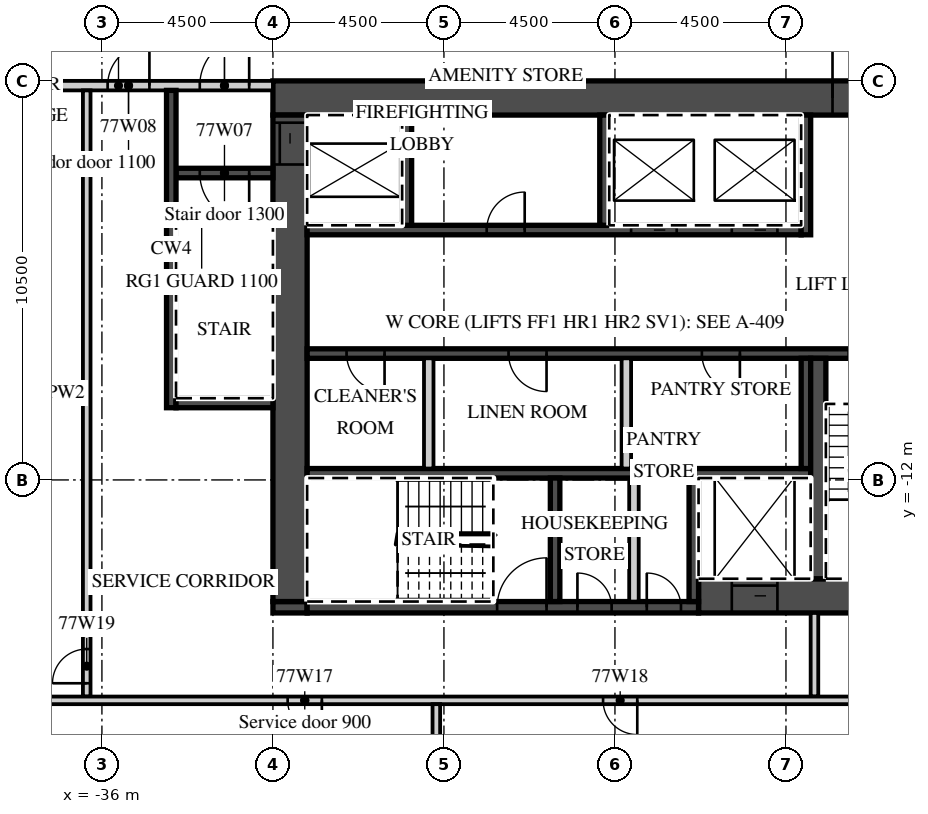
"""IFC4 building model, lengths in metres.
Left out: names, types, materials, properties, quantities, classifications, styles, units other than length and angle.
Written with IfcOpenShell. Run it as: python <this file> out.ifc"""

import sys

from ifc_helpers import new_model, si_unit, direction, frame, frame_2d, origin, place, context, subcontext, project, spatial, rectangle, extrude, element, fill, save


model = new_model("IFC4")
c1 = context("Model", 3, precision=1e-05, world=origin(), true_north=direction((0.0, 1.0)))
c2 = subcontext(c1, "Body", "Model", "MODEL_VIEW")
j1 = project(units=[si_unit("LENGTHUNIT", "METRE"), si_unit("PLANEANGLEUNIT", "RADIAN")], contexts=[c1])
p1 = place(None, origin())
s1 = spatial("IfcSite", under=j1, at=p1, CompositionType="ELEMENT")
p2 = place(p1, origin())
s2 = spatial("IfcBuilding", under=s1, at=p2, CompositionType="ELEMENT")
p3 = place(p2, frame((0.0, 0.0, 304.8)))
s3 = spatial("IfcBuildingStorey", under=s2, at=p3, CompositionType="ELEMENT", Elevation=304.8)
p4 = place(p3, frame((-31.5, -1.95, 0.0), z_axis=(0.0, 0.0, 1.0), x_axis=(1.0, 0.0, 0.0)))
e1 = element("IfcWall", 1, at=p4, inside=s3, PredefinedType="SHEAR", context=c2, shape_type="SweptSolid", body=[
    extrude(rectangle(XDim=18.0, YDim=0.9, at=frame_2d((9.0, 0.0))), origin(), (0.0, 0.0, 1.0), 2.9),
])
p5 = place(p4, frame((14.725, 0.0, 0.0)))
e2 = element("IfcOpeningElement", 2, at=p5, cuts=e1, PredefinedType="OPENING", context=c2, shape_type="SweptSolid", body=[
    extrude(rectangle(XDim=1.8, YDim=2.1, at=frame_2d((0.9, 1.05))), frame((0.0, 0.46, 0.0), z_axis=(0.0, -1.0, 0.0), x_axis=(1.0, 0.0, 0.0)), (0.0, 0.0, 1.0), 0.92),
])
p6 = place(p3, frame((-20.3, -15.05, 0.0), z_axis=(0.0, 0.0, 1.0), x_axis=(1.0, 0.0, 0.0)))
e3 = element("IfcWall", 3, at=p6, inside=s3, PredefinedType="SHEAR", context=c2, shape_type="SweptSolid", body=[
    extrude(rectangle(XDim=6.8, YDim=0.9, at=frame_2d((3.4, 0.0))), origin(), (0.0, 0.0, 1.0), 2.9),
])
p7 = place(p6, frame((0.875, 0.0, 0.0)))
e4 = element("IfcOpeningElement", 4, at=p7, cuts=e3, PredefinedType="OPENING", context=c2, shape_type="SweptSolid", body=[
    extrude(rectangle(XDim=1.2, YDim=2.1, at=frame_2d((0.6, 1.05))), frame((0.0, 0.46, 0.0), z_axis=(0.0, -1.0, 0.0), x_axis=(1.0, 0.0, 0.0)), (0.0, 0.0, 1.0), 0.92),
])
p8 = place(p3, frame((-31.5, -15.35, 0.0), z_axis=(0.0, 0.0, 1.0), x_axis=(1.0, 0.0, 0.0)))
e5 = element("IfcWall", 5, at=p8, inside=s3, PredefinedType="SHEAR", context=c2, shape_type="SweptSolid", body=[
    extrude(rectangle(XDim=0.9, YDim=0.3, at=frame_2d((0.45, 0.0))), origin(), (0.0, 0.0, 1.0), 2.9),
])
p9 = place(p3, frame((-30.6, -15.35, 0.0), z_axis=(0.0, 0.0, 1.0), x_axis=(1.0, 0.0, 0.0)))
e6 = element("IfcWall", 6, at=p9, inside=s3, PredefinedType="SHEAR", context=c2, shape_type="SweptSolid", body=[
    extrude(rectangle(XDim=10.3, YDim=0.3, at=frame_2d((5.15, 0.0))), origin(), (0.0, 0.0, 1.0), 2.9),
])
p10 = place(p9, frame((5.0, 0.0, 0.0)))
e7 = element("IfcOpeningElement", 7, at=p10, cuts=e6, PredefinedType="OPENING", context=c2, shape_type="SweptSolid", body=[
    extrude(rectangle(XDim=1.3, YDim=2.1, at=frame_2d((0.65, 1.05))), frame((0.0, 0.16, 0.0), z_axis=(0.0, -1.0, 0.0), x_axis=(1.0, 0.0, 0.0)), (0.0, 0.0, 1.0), 0.32),
])
p11 = place(p9, frame((7.113, 0.0, 0.0)))
e8 = element("IfcOpeningElement", 8, at=p11, cuts=e6, PredefinedType="OPENING", context=c2, shape_type="SweptSolid", body=[
    extrude(rectangle(XDim=0.9, YDim=2.1, at=frame_2d((0.45, 1.05))), frame((0.0, 0.16, 0.0), z_axis=(0.0, -1.0, 0.0), x_axis=(1.0, 0.0, 0.0)), (0.0, 0.0, 1.0), 0.32),
])
p12 = place(p9, frame((8.938, 0.0, 0.0)))
e9 = element("IfcOpeningElement", 9, at=p12, cuts=e6, PredefinedType="OPENING", context=c2, shape_type="SweptSolid", body=[
    extrude(rectangle(XDim=0.9, YDim=2.1, at=frame_2d((0.45, 1.05))), frame((0.0, 0.16, 0.0), z_axis=(0.0, -1.0, 0.0), x_axis=(1.0, 0.0, 0.0)), (0.0, 0.0, 1.0), 0.32),
])
p13 = place(p3, frame((-31.05, -15.2, 0.0), z_axis=(0.0, 0.0, 1.0), x_axis=(0.0, 1.0, 0.0)))
e10 = element("IfcWall", 10, at=p13, inside=s3, PredefinedType="SHEAR", context=c2, shape_type="SweptSolid", body=[
    extrude(rectangle(XDim=12.8, YDim=0.9, at=frame_2d((6.4, 0.0))), origin(), (0.0, 0.0, 1.0), 2.9),
])
p14 = place(p13, frame((11.5, 0.0, 0.0)))
e11 = element("IfcOpeningElement", 11, at=p14, cuts=e10, PredefinedType="OPENING", context=c2, shape_type="SweptSolid", body=[
    extrude(rectangle(XDim=1.1, YDim=2.1, at=frame_2d((0.55, 1.05))), frame((0.0, 0.46, 0.0), z_axis=(0.0, -1.0, 0.0), x_axis=(1.0, 0.0, 0.0)), (0.0, 0.0, 1.0), 0.92),
])
p15 = place(p3, frame((-30.6, -5.425, 0.0), z_axis=(0.0, 0.0, 1.0), x_axis=(1.0, 0.0, 0.0)))
e12 = element("IfcWall", 12, at=p15, inside=s3, PredefinedType="SHEAR", context=c2, shape_type="SweptSolid", body=[
    extrude(rectangle(XDim=13.0, YDim=0.25, at=frame_2d((6.5, 0.0))), origin(), (0.0, 0.0, 1.0), 2.9),
])
p16 = place(p15, frame((8.525, 0.0, 0.0)))
e13 = element("IfcOpeningElement", 13, at=p16, cuts=e12, PredefinedType="OPENING", context=c2, shape_type="SweptSolid", body=[
    extrude(rectangle(XDim=1.2, YDim=2.1, at=frame_2d((0.6, 1.05))), frame((0.0, 0.135, 0.0), z_axis=(0.0, -1.0, 0.0), x_axis=(1.0, 0.0, 0.0)), (0.0, 0.0, 1.0), 0.27),
])
p17 = place(p15, frame((11.175, 0.0, 0.0)))
e14 = element("IfcOpeningElement", 14, at=p17, cuts=e12, PredefinedType="OPENING", context=c2, shape_type="SweptSolid", body=[
    extrude(rectangle(XDim=1.2, YDim=2.1, at=frame_2d((0.6, 1.05))), frame((0.0, 0.135, 0.0), z_axis=(0.0, -1.0, 0.0), x_axis=(1.0, 0.0, 0.0)), (0.0, 0.0, 1.0), 0.27),
])
p18 = place(p15, frame((4.725, 0.0, 0.0)))
e15 = element("IfcOpeningElement", 15, at=p18, cuts=e12, PredefinedType="OPENING", context=c2, shape_type="SweptSolid", body=[
    extrude(rectangle(XDim=1.0, YDim=2.1, at=frame_2d((0.5, 1.05))), frame((0.0, 0.135, 0.0), z_axis=(0.0, -1.0, 0.0), x_axis=(1.0, 0.0, 0.0)), (0.0, 0.0, 1.0), 0.27),
])
p19 = place(p3, frame((-17.475, -5.55, 0.0), z_axis=(0.0, 0.0, 1.0), x_axis=(0.0, 1.0, 0.0)))
e16 = element("IfcWall", 16, at=p19, inside=s3, PredefinedType="SHEAR", context=c2, shape_type="SweptSolid", body=[
    extrude(rectangle(XDim=3.15, YDim=0.25, at=frame_2d((1.575, 0.0))), origin(), (0.0, 0.0, 1.0), 2.9),
])
for number, where, z_axis, x_axis in (
    (17, (-27.975, -5.3, 0.0), (0.0, 0.0, 1.0), (0.0, 1.0, 0.0)),
    (18, (-22.775, -5.3, 0.0), (0.0, 0.0, 1.0), (0.0, 1.0, 0.0)),
):
    element("IfcWall", number, at=place(p3, frame(where, z_axis=z_axis, x_axis=x_axis)), inside=s3, PredefinedType="SHEAR", context=c2, shape_type="SweptSolid", body=[
        extrude(rectangle(XDim=2.9, YDim=0.25, at=frame_2d((1.45, 0.0))), origin(), (0.0, 0.0, 1.0), 2.9),
    ])
p20 = place(p3, frame((-30.6, -8.675, 0.0), z_axis=(0.0, 0.0, 1.0), x_axis=(1.0, 0.0, 0.0)))
e19 = element("IfcWall", 19, at=p20, inside=s3, PredefinedType="SHEAR", context=c2, shape_type="SweptSolid", body=[
    extrude(rectangle(XDim=16.2, YDim=0.25, at=frame_2d((8.1, 0.0))), origin(), (0.0, 0.0, 1.0), 2.9),
])
p21 = place(p20, frame((14.25, 0.0, 0.0)))
e20 = element("IfcOpeningElement", 20, at=p21, cuts=e19, PredefinedType="OPENING", context=c2, shape_type="SweptSolid", body=[
    extrude(rectangle(XDim=1.3, YDim=2.1, at=frame_2d((0.65, 1.05))), frame((0.0, 0.135, 0.0), z_axis=(0.0, -1.0, 0.0), x_axis=(1.0, 0.0, 0.0)), (0.0, 0.0, 1.0), 0.27),
])
p22 = place(p20, frame((1.038, 0.0, 0.0)))
e21 = element("IfcOpeningElement", 21, at=p22, cuts=e19, PredefinedType="OPENING", context=c2, shape_type="SweptSolid", body=[
    extrude(rectangle(XDim=1.0, YDim=2.1, at=frame_2d((0.5, 1.05))), frame((0.0, 0.135, 0.0), z_axis=(0.0, -1.0, 0.0), x_axis=(1.0, 0.0, 0.0)), (0.0, 0.0, 1.0), 0.27),
])
p23 = place(p20, frame((5.3, 0.0, 0.0)))
e22 = element("IfcOpeningElement", 22, at=p23, cuts=e19, PredefinedType="OPENING", context=c2, shape_type="SweptSolid", body=[
    extrude(rectangle(XDim=1.0, YDim=2.1, at=frame_2d((0.5, 1.05))), frame((0.0, 0.135, 0.0), z_axis=(0.0, -1.0, 0.0), x_axis=(1.0, 0.0, 0.0)), (0.0, 0.0, 1.0), 0.27),
])
p24 = place(p20, frame((10.387, 0.0, 0.0)))
e23 = element("IfcOpeningElement", 23, at=p24, cuts=e19, PredefinedType="OPENING", context=c2, shape_type="SweptSolid", body=[
    extrude(rectangle(XDim=1.0, YDim=2.1, at=frame_2d((0.5, 1.05))), frame((0.0, 0.135, 0.0), z_axis=(0.0, -1.0, 0.0), x_axis=(1.0, 0.0, 0.0)), (0.0, 0.0, 1.0), 0.27),
])
p25 = place(p3, frame((-30.6, -11.825, 0.0), z_axis=(0.0, 0.0, 1.0), x_axis=(1.0, 0.0, 0.0)))
e24 = element("IfcWall", 24, at=p25, inside=s3, PredefinedType="SHEAR", context=c2, shape_type="SweptSolid", body=[
    extrude(rectangle(XDim=13.25, YDim=0.25, at=frame_2d((6.625, 0.0))), origin(), (0.0, 0.0, 1.0), 2.9),
])
p26 = place(p3, frame((-17.475, -11.7, 0.0), z_axis=(0.0, 0.0, 1.0), x_axis=(0.0, 1.0, 0.0)))
e25 = element("IfcWall", 25, at=p26, inside=s3, PredefinedType="SHEAR", context=c2, shape_type="SweptSolid", body=[
    extrude(rectangle(XDim=2.9, YDim=0.25, at=frame_2d((1.45, 0.0))), origin(), (0.0, 0.0, 1.0), 2.9),
])
for number, where, z_axis, x_axis in (
    (26, (-27.4, -11.7, 0.0), (0.0, 0.0, 1.0), (0.0, 1.0, 0.0)),
    (27, (-22.2, -11.7, 0.0), (0.0, 0.0, 1.0), (0.0, 1.0, 0.0)),
):
    element("IfcWall", number, at=place(p3, frame(where, z_axis=z_axis, x_axis=x_axis)), inside=s3, PredefinedType="PARTITIONING", context=c2, shape_type="SweptSolid", body=[
        extrude(rectangle(XDim=2.9, YDim=0.25, at=frame_2d((1.45, 0.0))), origin(), (0.0, 0.0, 1.0), 2.9),
    ])
p27 = place(p3, frame((-17.15, -14.6, 0.0), z_axis=(0.0, 0.0, 1.0), x_axis=(0.0, 1.0, 0.0)))
e28 = element("IfcWall", 28, at=p27, inside=s3, PredefinedType="SHEAR", context=c2, shape_type="SweptSolid", body=[
    extrude(rectangle(XDim=5.8, YDim=0.4, at=frame_2d((2.9, 0.0))), origin(), (0.0, 0.0, 1.0), 2.9),
])
for number, where, z_axis, x_axis in (
    (29, (-20.425, -15.2, 0.0), (0.0, 0.0, 1.0), (0.0, 1.0, 0.0)),
    (30, (-24.075, -15.2, 0.0), (0.0, 0.0, 1.0), (0.0, 1.0, 0.0)),
):
    element("IfcWall", number, at=place(p3, frame(where, z_axis=z_axis, x_axis=x_axis)), inside=s3, PredefinedType="SHEAR", context=c2, shape_type="SweptSolid", body=[
        extrude(rectangle(XDim=3.25, YDim=0.25, at=frame_2d((1.625, 0.0))), origin(), (0.0, 0.0, 1.0), 2.9),
    ])
p28 = place(p3, frame((-22.0, -15.2, 0.0), z_axis=(0.0, 0.0, 1.0), x_axis=(0.0, 1.0, 0.0)))
e31 = element("IfcWall", 31, at=p28, inside=s3, PredefinedType="PARTITIONING", context=c2, shape_type="SweptSolid", body=[
    extrude(rectangle(XDim=3.25, YDim=0.25, at=frame_2d((1.625, 0.0))), origin(), (0.0, 0.0, 1.0), 2.9),
])
p29 = place(p3, frame((-39.627, -1.625, 0.0), z_axis=(0.0, 0.0, 1.0), x_axis=(1.0, 0.0, 0.0)))
e32 = element("IfcWall", 32, at=p29, inside=s3, PredefinedType="PARTITIONING", context=c2, shape_type="SweptSolid", body=[
    extrude(rectangle(XDim=8.127, YDim=0.25, at=frame_2d((4.063, 0.0))), origin(), (0.0, 0.0, 1.0), 2.9),
])
p30 = place(p29, frame((6.202, 0.0, 0.0)))
e33 = element("IfcOpeningElement", 33, at=p30, cuts=e32, PredefinedType="OPENING", context=c2, shape_type="SweptSolid", body=[
    extrude(rectangle(XDim=1.3, YDim=2.1, at=frame_2d((0.65, 1.05))), frame((0.0, 0.135, 0.0), z_axis=(0.0, -1.0, 0.0), x_axis=(1.0, 0.0, 0.0)), (0.0, 0.0, 1.0), 0.27),
])
p31 = place(p29, frame((3.777, 0.0, 0.0)))
e34 = element("IfcOpeningElement", 34, at=p31, cuts=e32, PredefinedType="OPENING", context=c2, shape_type="SweptSolid", body=[
    extrude(rectangle(XDim=1.1, YDim=2.1, at=frame_2d((0.55, 1.05))), frame((0.0, 0.135, 0.0), z_axis=(0.0, -1.0, 0.0), x_axis=(1.0, 0.0, 0.0)), (0.0, 0.0, 1.0), 0.27),
])
p32 = place(p3, frame((-34.05, -3.925, 0.0), z_axis=(0.0, 0.0, 1.0), x_axis=(1.0, 0.0, 0.0)))
e35 = element("IfcWall", 35, at=p32, inside=s3, PredefinedType="SHEAR", context=c2, shape_type="SweptSolid", body=[
    extrude(rectangle(XDim=2.55, YDim=0.25, at=frame_2d((1.275, 0.0))), origin(), (0.0, 0.0, 1.0), 2.9),
])
p33 = place(p32, frame((0.625, 0.0, 0.0)))
e36 = element("IfcOpeningElement", 36, at=p33, cuts=e35, PredefinedType="OPENING", context=c2, shape_type="SweptSolid", body=[
    extrude(rectangle(XDim=1.3, YDim=2.1, at=frame_2d((0.65, 1.05))), frame((0.0, 0.135, 0.0), z_axis=(0.0, -1.0, 0.0), x_axis=(1.0, 0.0, 0.0)), (0.0, 0.0, 1.0), 0.27),
])
p34 = place(p3, frame((-34.175, -10.1, 0.0), z_axis=(0.0, 0.0, 1.0), x_axis=(0.0, 1.0, 0.0)))
e37 = element("IfcWall", 37, at=p34, inside=s3, PredefinedType="SHEAR", context=c2, shape_type="SweptSolid", body=[
    extrude(rectangle(XDim=8.35, YDim=0.25, at=frame_2d((4.175, 0.0))), origin(), (0.0, 0.0, 1.0), 2.9),
])
p35 = place(p3, frame((-34.05, -9.975, 0.0), z_axis=(0.0, 0.0, 1.0), x_axis=(1.0, 0.0, 0.0)))
e38 = element("IfcWall", 38, at=p35, inside=s3, PredefinedType="SHEAR", context=c2, shape_type="SweptSolid", body=[
    extrude(rectangle(XDim=2.55, YDim=0.25, at=frame_2d((1.275, 0.0))), origin(), (0.0, 0.0, 1.0), 2.9),
])
p36 = place(p3, frame((-17.25, -17.7, 0.0), z_axis=(0.0, 0.0, 1.0), x_axis=(0.0, 1.0, 0.0)))
e39 = element("IfcWall", 39, at=p36, inside=s3, PredefinedType="PARTITIONING", context=c2, shape_type="SweptSolid", body=[
    extrude(rectangle(XDim=2.2, YDim=0.2, at=frame_2d((1.1, 0.0))), origin(), (0.0, 0.0, 1.0), 2.9),
])
p37 = place(p3, frame((-36.4, -17.7, 0.0), z_axis=(0.0, 0.0, 1.0), x_axis=(0.0, 1.0, 0.0)))
e40 = element("IfcWall", 40, at=p37, inside=s3, PredefinedType="PARTITIONING", context=c2, shape_type="SweptSolid", body=[
    extrude(rectangle(XDim=15.95, YDim=0.2, at=frame_2d((7.975, 0.0))), origin(), (0.0, 0.0, 1.0), 2.9),
])
p38 = place(p37, frame((0.35, 0.0, 0.0)))
e41 = element("IfcOpeningElement", 41, at=p38, cuts=e40, PredefinedType="OPENING", context=c2, shape_type="SweptSolid", body=[
    extrude(rectangle(XDim=0.9, YDim=2.1, at=frame_2d((0.45, 1.05))), frame((0.0, 0.11, 0.0), z_axis=(0.0, -1.0, 0.0), x_axis=(1.0, 0.0, 0.0)), (0.0, 0.0, 1.0), 0.22),
])
p39 = place(p3, frame((-38.07, -17.8, 0.0), z_axis=(0.0, 0.0, 1.0), x_axis=(1.0, 0.0, 0.0)))
e42 = element("IfcWall", 42, at=p39, inside=s3, PredefinedType="PARTITIONING", context=c2, shape_type="SweptSolid", body=[
    extrude(rectangle(XDim=24.47, YDim=0.2, at=frame_2d((12.235, 0.0))), origin(), (0.0, 0.0, 1.0), 2.9),
])
p40 = place(p39, frame((6.957, 0.0, 0.0)))
e43 = element("IfcOpeningElement", 43, at=p40, cuts=e42, PredefinedType="OPENING", context=c2, shape_type="SweptSolid", body=[
    extrude(rectangle(XDim=0.9, YDim=2.1, at=frame_2d((0.45, 1.05))), frame((0.0, 0.11, 0.0), z_axis=(0.0, -1.0, 0.0), x_axis=(1.0, 0.0, 0.0)), (0.0, 0.0, 1.0), 0.22),
])
p41 = place(p39, frame((15.257, 0.0, 0.0)))
e44 = element("IfcOpeningElement", 44, at=p41, cuts=e42, PredefinedType="OPENING", context=c2, shape_type="SweptSolid", body=[
    extrude(rectangle(XDim=0.9, YDim=2.1, at=frame_2d((0.45, 1.05))), frame((0.0, 0.11, 0.0), z_axis=(0.0, -1.0, 0.0), x_axis=(1.0, 0.0, 0.0)), (0.0, 0.0, 1.0), 0.22),
])
p42 = place(p3, frame((-27.2, -22.716, 0.0), z_axis=(0.0, 0.0, 1.0), x_axis=(0.0, 1.0, 0.0)))
e45 = element("IfcWall", 45, at=p42, inside=s3, PredefinedType="PARTITIONING", context=c2, shape_type="SweptSolid", body=[
    extrude(rectangle(XDim=4.816, YDim=0.2, at=frame_2d((2.408, 0.0))), origin(), (0.0, 0.0, 1.0), 2.9),
])
p43 = place(p16, origin())
e46 = element("IfcDoor", 46, at=p43, inside=s3, OperationType="SLIDING_TO_LEFT", PredefinedType="DOOR", context=c2, shape_type="SweptSolid", body=[
    extrude(rectangle(XDim=1.2, YDim=2.1, at=frame_2d((0.6, 1.05))), frame((0.0, 0.025, 0.0), z_axis=(0.0, -1.0, 0.0), x_axis=(1.0, 0.0, 0.0)), (0.0, 0.0, 1.0), 0.05),
])
fill(e13, e46)
p44 = place(p17, origin())
e47 = element("IfcDoor", 47, at=p44, inside=s3, OperationType="SLIDING_TO_RIGHT", PredefinedType="DOOR", context=c2, shape_type="SweptSolid", body=[
    extrude(rectangle(XDim=1.2, YDim=2.1, at=frame_2d((0.6, 1.05))), frame((0.0, 0.025, 0.0), z_axis=(0.0, -1.0, 0.0), x_axis=(1.0, 0.0, 0.0)), (0.0, 0.0, 1.0), 0.05),
])
fill(e14, e47)
p45 = place(p7, origin())
e48 = element("IfcDoor", 48, at=p45, inside=s3, OperationType="SLIDING_TO_LEFT", PredefinedType="DOOR", context=c2, shape_type="SweptSolid", body=[
    extrude(rectangle(XDim=1.2, YDim=2.1, at=frame_2d((0.6, 1.05))), frame((0.0, 0.025, 0.0), z_axis=(0.0, -1.0, 0.0), x_axis=(1.0, 0.0, 0.0)), (0.0, 0.0, 1.0), 0.05),
])
fill(e4, e48)
p46 = place(p14, origin())
e49 = element("IfcDoor", 49, at=p46, inside=s3, OperationType="SLIDING_TO_RIGHT", PredefinedType="DOOR", context=c2, shape_type="SweptSolid", body=[
    extrude(rectangle(XDim=1.1, YDim=2.1, at=frame_2d((0.55, 1.05))), frame((0.0, 0.025, 0.0), z_axis=(0.0, -1.0, 0.0), x_axis=(1.0, 0.0, 0.0)), (0.0, 0.0, 1.0), 0.05),
])
fill(e11, e49)
p47 = place(p5, origin())
e50 = element("IfcDoor", 50, at=p47, inside=s3, OperationType="DOUBLE_DOOR_DOUBLE_SWING", PredefinedType="DOOR", context=c2, shape_type="SweptSolid", body=[
    extrude(rectangle(XDim=1.8, YDim=2.1, at=frame_2d((0.9, 1.05))), frame((0.0, 0.025, 0.0), z_axis=(0.0, -1.0, 0.0), x_axis=(1.0, 0.0, 0.0)), (0.0, 0.0, 1.0), 0.05),
])
fill(e2, e50)
p48 = place(p30, origin())
e51 = element("IfcDoor", 51, at=p48, inside=s3, OperationType="SINGLE_SWING_RIGHT", PredefinedType="DOOR", context=c2, shape_type="SweptSolid", body=[
    extrude(rectangle(XDim=1.3, YDim=2.1, at=frame_2d((0.65, 1.05))), frame((0.0, 0.025, 0.0), z_axis=(0.0, -1.0, 0.0), x_axis=(1.0, 0.0, 0.0)), (0.0, 0.0, 1.0), 0.05),
])
fill(e33, e51)
p49 = place(p33, origin())
e52 = element("IfcDoor", 52, at=p49, inside=s3, OperationType="SINGLE_SWING_RIGHT", PredefinedType="DOOR", context=c2, shape_type="SweptSolid", body=[
    extrude(rectangle(XDim=1.3, YDim=2.1, at=frame_2d((0.65, 1.05))), frame((0.0, 0.025, 0.0), z_axis=(0.0, -1.0, 0.0), x_axis=(1.0, 0.0, 0.0)), (0.0, 0.0, 1.0), 0.05),
])
fill(e36, e52)
p50 = place(p31, origin())
e53 = element("IfcDoor", 53, at=p50, inside=s3, OperationType="SINGLE_SWING_RIGHT", PredefinedType="DOOR", context=c2, shape_type="SweptSolid", body=[
    extrude(rectangle(XDim=1.1, YDim=2.1, at=frame_2d((0.55, 1.05))), frame((0.0, 0.025, 0.0), z_axis=(0.0, -1.0, 0.0), x_axis=(1.0, 0.0, 0.0)), (0.0, 0.0, 1.0), 0.05),
])
fill(e34, e53)
p51 = place(p21, origin())
e54 = element("IfcDoor", 54, at=p51, inside=s3, OperationType="SINGLE_SWING_RIGHT", PredefinedType="DOOR", context=c2, shape_type="SweptSolid", body=[
    extrude(rectangle(XDim=1.3, YDim=2.1, at=frame_2d((0.65, 1.05))), frame((0.0, 0.025, 0.0), z_axis=(0.0, -1.0, 0.0), x_axis=(1.0, 0.0, 0.0)), (0.0, 0.0, 1.0), 0.05),
])
fill(e20, e54)
p52 = place(p10, origin())
e55 = element("IfcDoor", 55, at=p52, inside=s3, OperationType="SINGLE_SWING_RIGHT", PredefinedType="DOOR", context=c2, shape_type="SweptSolid", body=[
    extrude(rectangle(XDim=1.3, YDim=2.1, at=frame_2d((0.65, 1.05))), frame((0.0, 0.025, 0.0), z_axis=(0.0, -1.0, 0.0), x_axis=(1.0, 0.0, 0.0)), (0.0, 0.0, 1.0), 0.05),
])
fill(e7, e55)
p53 = place(p11, origin())
e56 = element("IfcDoor", 56, at=p53, inside=s3, OperationType="SINGLE_SWING_LEFT", PredefinedType="DOOR", context=c2, shape_type="SweptSolid", body=[
    extrude(rectangle(XDim=0.9, YDim=2.1, at=frame_2d((0.45, 1.05))), frame((0.0, 0.025, 0.0), z_axis=(0.0, -1.0, 0.0), x_axis=(1.0, 0.0, 0.0)), (0.0, 0.0, 1.0), 0.05),
])
fill(e8, e56)
p54 = place(p12, origin())
e57 = element("IfcDoor", 57, at=p54, inside=s3, OperationType="SINGLE_SWING_LEFT", PredefinedType="DOOR", context=c2, shape_type="SweptSolid", body=[
    extrude(rectangle(XDim=0.9, YDim=2.1, at=frame_2d((0.45, 1.05))), frame((0.0, 0.025, 0.0), z_axis=(0.0, -1.0, 0.0), x_axis=(1.0, 0.0, 0.0)), (0.0, 0.0, 1.0), 0.05),
])
fill(e9, e57)
p55 = place(p22, origin())
e58 = element("IfcDoor", 58, at=p55, inside=s3, OperationType="SINGLE_SWING_RIGHT", PredefinedType="DOOR", context=c2, shape_type="SweptSolid", body=[
    extrude(rectangle(XDim=1.0, YDim=2.1, at=frame_2d((0.5, 1.05))), frame((0.0, 0.025, 0.0), z_axis=(0.0, -1.0, 0.0), x_axis=(1.0, 0.0, 0.0)), (0.0, 0.0, 1.0), 0.05),
])
fill(e21, e58)
p56 = place(p23, origin())
e59 = element("IfcDoor", 59, at=p56, inside=s3, OperationType="SINGLE_SWING_RIGHT", PredefinedType="DOOR", context=c2, shape_type="SweptSolid", body=[
    extrude(rectangle(XDim=1.0, YDim=2.1, at=frame_2d((0.5, 1.05))), frame((0.0, 0.025, 0.0), z_axis=(0.0, -1.0, 0.0), x_axis=(1.0, 0.0, 0.0)), (0.0, 0.0, 1.0), 0.05),
])
fill(e22, e59)
p57 = place(p24, origin())
e60 = element("IfcDoor", 60, at=p57, inside=s3, OperationType="SINGLE_SWING_RIGHT", PredefinedType="DOOR", context=c2, shape_type="SweptSolid", body=[
    extrude(rectangle(XDim=1.0, YDim=2.1, at=frame_2d((0.5, 1.05))), frame((0.0, 0.025, 0.0), z_axis=(0.0, -1.0, 0.0), x_axis=(1.0, 0.0, 0.0)), (0.0, 0.0, 1.0), 0.05),
])
fill(e23, e60)
p58 = place(p18, origin())
e61 = element("IfcDoor", 61, at=p58, inside=s3, OperationType="SINGLE_SWING_RIGHT", PredefinedType="DOOR", context=c2, shape_type="SweptSolid", body=[
    extrude(rectangle(XDim=1.0, YDim=2.1, at=frame_2d((0.5, 1.05))), frame((0.0, 0.025, 0.0), z_axis=(0.0, -1.0, 0.0), x_axis=(1.0, 0.0, 0.0)), (0.0, 0.0, 1.0), 0.05),
])
fill(e15, e61)
p59 = place(p40, origin())
e62 = element("IfcDoor", 62, at=p59, inside=s3, OperationType="SINGLE_SWING_RIGHT", PredefinedType="DOOR", context=c2, shape_type="SweptSolid", body=[
    extrude(rectangle(XDim=0.9, YDim=2.1, at=frame_2d((0.45, 1.05))), frame((0.0, 0.025, 0.0), z_axis=(0.0, -1.0, 0.0), x_axis=(1.0, 0.0, 0.0)), (0.0, 0.0, 1.0), 0.05),
])
fill(e43, e62)
p60 = place(p41, origin())
e63 = element("IfcDoor", 63, at=p60, inside=s3, OperationType="SINGLE_SWING_RIGHT", PredefinedType="DOOR", context=c2, shape_type="SweptSolid", body=[
    extrude(rectangle(XDim=0.9, YDim=2.1, at=frame_2d((0.45, 1.05))), frame((0.0, 0.025, 0.0), z_axis=(0.0, -1.0, 0.0), x_axis=(1.0, 0.0, 0.0)), (0.0, 0.0, 1.0), 0.05),
])
fill(e44, e63)
p61 = place(p38, origin())
e64 = element("IfcDoor", 64, at=p61, inside=s3, OperationType="SINGLE_SWING_LEFT", PredefinedType="DOOR", context=c2, shape_type="SweptSolid", body=[
    extrude(rectangle(XDim=0.9, YDim=2.1, at=frame_2d((0.45, 1.05))), frame((0.0, 0.025, 0.0), z_axis=(0.0, -1.0, 0.0), x_axis=(1.0, 0.0, 0.0)), (0.0, 0.0, 1.0), 0.05),
])
fill(e41, e64)
save(model, sys.argv[1])
